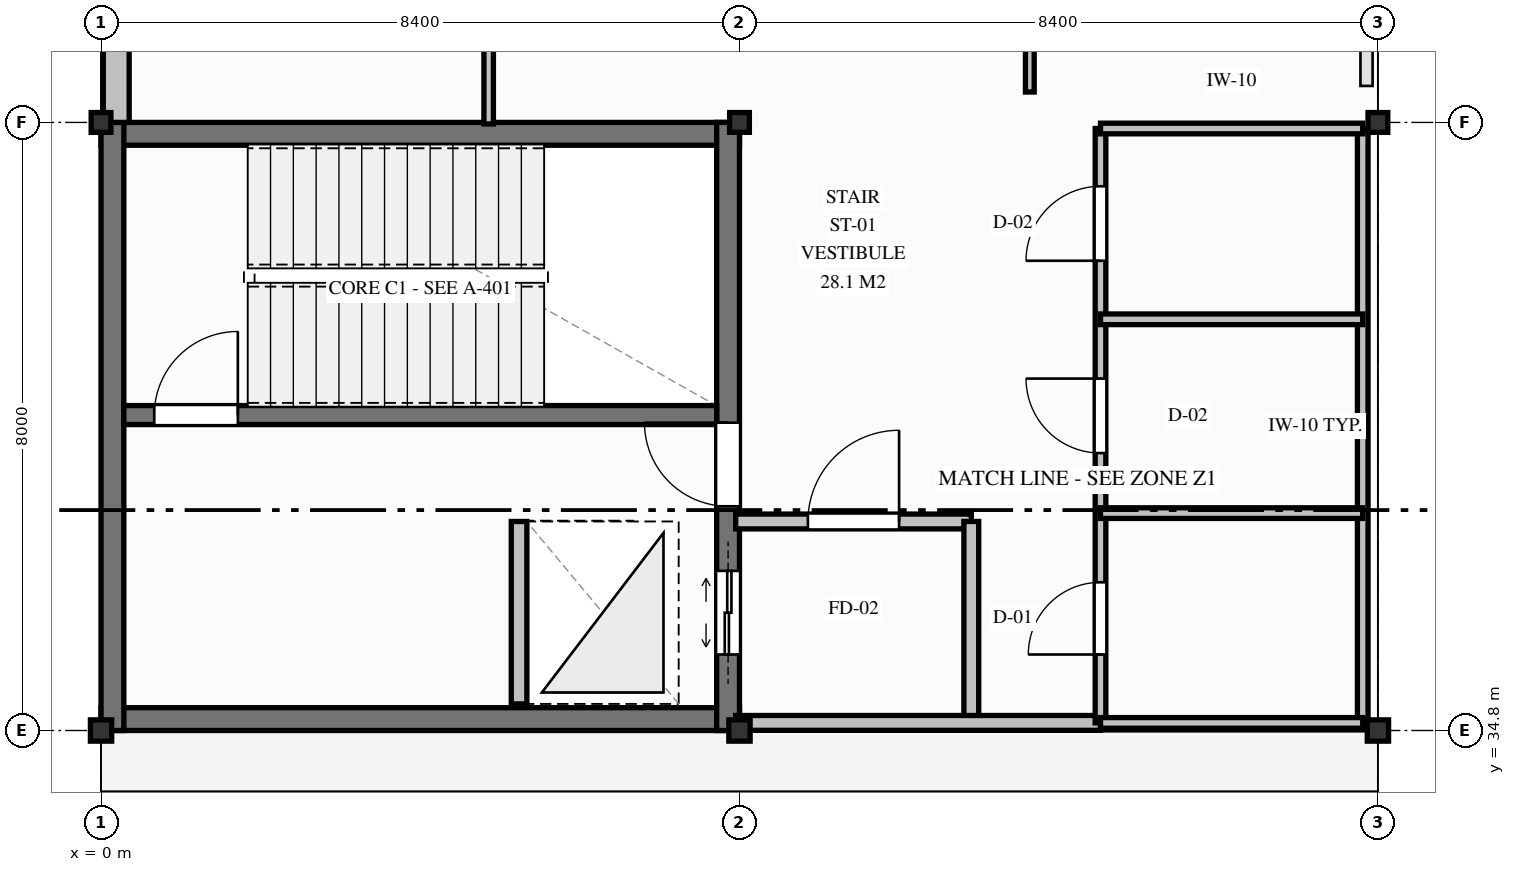
"""IFC4 building model, lengths in metres.
Left out: names, types, materials, properties, quantities, classifications, styles, units other than length and angle.
Written with IfcOpenShell. Run it as: python <this file> out.ifc"""

import sys

from ifc_helpers import new_model, si_unit, direction, frame, frame_2d, origin, origin_2d, place, context, subcontext, project, spatial, rectangle, i_section, extrude, element, fill, save


model = new_model("IFC4")
c1 = context("Model", 3, precision=1e-05, world=origin(), true_north=direction((0.0, 1.0)))
c2 = subcontext(c1, "Body", "Model", "MODEL_VIEW")
j1 = project(units=[si_unit("LENGTHUNIT", "METRE"), si_unit("PLANEANGLEUNIT", "RADIAN")], contexts=[c1])
p1 = place(None, origin())
s1 = spatial("IfcSite", under=j1, at=p1, CompositionType="ELEMENT")
p2 = place(p1, origin())
s2 = spatial("IfcBuilding", under=s1, at=p2, CompositionType="ELEMENT")
p3 = place(p2, frame((0.0, 0.0, 17.25)))
s3 = spatial("IfcBuildingStorey", under=s2, at=p3, CompositionType="ELEMENT", Elevation=17.25)
for number, where, z_axis, x_axis in (
    (1, (0.0, 42.65, 0.0), (0.0, 0.0, 1.0), (1.0, 0.0, 0.0)),
    (2, (0.0, 34.95, 0.0), (0.0, 0.0, 1.0), (1.0, 0.0, 0.0)),
):
    element("IfcWall", number, at=place(p3, frame(where, z_axis=z_axis, x_axis=x_axis)), inside=s3, PredefinedType="SHEAR", context=c2, shape_type="SweptSolid", body=[
        extrude(rectangle(XDim=8.4, YDim=0.3, at=frame_2d((4.2, 0.0))), origin(), (0.0, 0.0, 1.0), 4.05),
    ])
p4 = place(p3, frame((0.15, 34.8, 0.0), z_axis=(0.0, 0.0, 1.0), x_axis=(0.0, 1.0, 0.0)))
e3 = element("IfcWall", 3, at=p4, inside=s3, PredefinedType="SHEAR", context=c2, shape_type="SweptSolid", body=[
    extrude(rectangle(XDim=8.0, YDim=0.3, at=frame_2d((4.0, 0.0))), origin(), (0.0, 0.0, 1.0), 4.05),
])
p5 = place(p3, frame((8.25, 34.8, 0.0), z_axis=(0.0, 0.0, 1.0), x_axis=(0.0, 1.0, 0.0)))
e4 = element("IfcWall", 4, at=p5, inside=s3, PredefinedType="SHEAR", context=c2, shape_type="SweptSolid", body=[
    extrude(rectangle(XDim=8.0, YDim=0.3, at=frame_2d((4.0, 0.0))), origin(), (0.0, 0.0, 1.0), 4.05),
])
p6 = place(p5, frame((2.95, 0.0, 0.0)))
e5 = element("IfcOpeningElement", 5, at=p6, cuts=e4, PredefinedType="OPENING", context=c2, shape_type="SweptSolid", body=[
    extrude(rectangle(XDim=1.1, YDim=2.15, at=frame_2d((0.55, 1.075))), frame((0.0, 0.16, 0.0), z_axis=(0.0, -1.0, 0.0), x_axis=(1.0, 0.0, 0.0)), (0.0, 0.0, 1.0), 0.32),
])
p7 = place(p5, frame((1.0, 0.0, 0.0)))
e6 = element("IfcOpeningElement", 6, at=p7, cuts=e4, PredefinedType="OPENING", context=c2, shape_type="SweptSolid", body=[
    extrude(rectangle(XDim=1.1, YDim=2.1, at=frame_2d((0.55, 1.05))), frame((0.0, 0.16, 0.0), z_axis=(0.0, -1.0, 0.0), x_axis=(1.0, 0.0, 0.0)), (0.0, 0.0, 1.0), 0.32),
])
p8 = place(p3, frame((0.3, 38.95, 0.0), z_axis=(0.0, 0.0, 1.0), x_axis=(1.0, 0.0, 0.0)))
e7 = element("IfcWall", 7, at=p8, inside=s3, PredefinedType="SHEAR", context=c2, shape_type="SweptSolid", body=[
    extrude(rectangle(XDim=7.8, YDim=0.25, at=frame_2d((3.9, 0.0))), origin(), (0.0, 0.0, 1.0), 4.05),
])
p9 = place(p8, frame((0.4, 0.0, 0.0)))
e8 = element("IfcOpeningElement", 8, at=p9, cuts=e7, PredefinedType="OPENING", context=c2, shape_type="SweptSolid", body=[
    extrude(rectangle(XDim=1.1, YDim=2.15, at=frame_2d((0.55, 1.075))), frame((0.0, 0.135, 0.0), z_axis=(0.0, -1.0, 0.0), x_axis=(1.0, 0.0, 0.0)), (0.0, 0.0, 1.0), 0.27),
])
p10 = place(p3, frame((0.0, 34.8, 0.0), z_axis=(0.0, 0.0, 1.0), x_axis=(1.0, 0.0, 0.0)))
e9 = element("IfcColumn", 9, at=p10, inside=s3, PredefinedType="COLUMN", context=c2, shape_type="SweptSolid", body=[
    extrude(i_section(OverallWidth=0.28, OverallDepth=0.28, WebThickness=0.01, FlangeThickness=0.018, FilletRadius=0.024, at=origin_2d()), origin(), (0.0, 0.0, 1.0), 4.05),
])
p11 = place(p3, frame((0.0, 42.8, 0.0), z_axis=(0.0, 0.0, 1.0), x_axis=(1.0, 0.0, 0.0)))
e10 = element("IfcColumn", 10, at=p11, inside=s3, PredefinedType="COLUMN", context=c2, shape_type="SweptSolid", body=[
    extrude(i_section(OverallWidth=0.26, OverallDepth=0.26, WebThickness=0.01, FlangeThickness=0.018, FilletRadius=0.024, at=origin_2d()), origin(), (0.0, 0.0, 1.0), 4.05),
])
p12 = place(p3, frame((8.4, 34.8, 0.0), z_axis=(0.0, 0.0, 1.0), x_axis=(1.0, 0.0, 0.0)))
e11 = element("IfcColumn", 11, at=p12, inside=s3, PredefinedType="COLUMN", context=c2, shape_type="SweptSolid", body=[
    extrude(i_section(OverallWidth=0.28, OverallDepth=0.28, WebThickness=0.01, FlangeThickness=0.018, FilletRadius=0.024, at=origin_2d()), origin(), (0.0, 0.0, 1.0), 4.05),
])
p13 = place(p3, frame((8.4, 42.8, 0.0), z_axis=(0.0, 0.0, 1.0), x_axis=(1.0, 0.0, 0.0)))
e12 = element("IfcColumn", 12, at=p13, inside=s3, PredefinedType="COLUMN", context=c2, shape_type="SweptSolid", body=[
    extrude(i_section(OverallWidth=0.26, OverallDepth=0.26, WebThickness=0.01, FlangeThickness=0.018, FilletRadius=0.024, at=origin_2d()), origin(), (0.0, 0.0, 1.0), 4.05),
])
p14 = place(p3, frame((16.8, 34.8, 0.0), z_axis=(0.0, 0.0, 1.0), x_axis=(1.0, 0.0, 0.0)))
e13 = element("IfcColumn", 13, at=p14, inside=s3, PredefinedType="COLUMN", context=c2, shape_type="SweptSolid", body=[
    extrude(i_section(OverallWidth=0.28, OverallDepth=0.28, WebThickness=0.01, FlangeThickness=0.018, FilletRadius=0.024, at=origin_2d()), origin(), (0.0, 0.0, 1.0), 4.05),
])
p15 = place(p3, frame((16.8, 42.8, 0.0), z_axis=(0.0, 0.0, 1.0), x_axis=(1.0, 0.0, 0.0)))
e14 = element("IfcColumn", 14, at=p15, inside=s3, PredefinedType="COLUMN", context=c2, shape_type="SweptSolid", body=[
    extrude(i_section(OverallWidth=0.26, OverallDepth=0.26, WebThickness=0.01, FlangeThickness=0.018, FilletRadius=0.024, at=origin_2d()), origin(), (0.0, 0.0, 1.0), 4.05),
])
p16 = place(p3, frame((0.2, 42.8, 0.0), z_axis=(0.0, 0.0, 1.0), x_axis=(0.0, 1.0, 0.0)))
e15 = element("IfcWall", 15, at=p16, inside=s3, PredefinedType="SOLIDWALL", context=c2, shape_type="SweptSolid", body=[
    extrude(rectangle(XDim=8.0, YDim=0.34, at=frame_2d((4.0, 0.0))), origin(), (0.0, 0.0, 1.0), 3.278),
])
p17 = place(p16, frame((1.992, 0.0, 0.85)))
e16 = element("IfcOpeningElement", 16, at=p17, cuts=e15, PredefinedType="OPENING", context=c2, shape_type="SweptSolid", body=[
    extrude(rectangle(XDim=1.35, YDim=1.8, at=frame_2d((0.675, 0.9))), frame((0.0, 0.18, 0.0), z_axis=(0.0, -1.0, 0.0), x_axis=(1.0, 0.0, 0.0)), (0.0, 0.0, 1.0), 0.36),
])
p18 = place(p16, frame((4.883, 0.0, 0.85)))
e17 = element("IfcOpeningElement", 17, at=p18, cuts=e15, PredefinedType="OPENING", context=c2, shape_type="SweptSolid", body=[
    extrude(rectangle(XDim=0.9, YDim=1.8, at=frame_2d((0.45, 0.9))), frame((0.0, 0.18, 0.0), z_axis=(0.0, -1.0, 0.0), x_axis=(1.0, 0.0, 0.0)), (0.0, 0.0, 1.0), 0.36),
])
p19 = place(p3, frame((5.5, 35.15, 0.0), z_axis=(0.0, 0.0, 1.0), x_axis=(0.0, 1.0, 0.0)))
e18 = element("IfcWall", 18, at=p19, inside=s3, PredefinedType="PARTITIONING", context=c2, shape_type="SweptSolid", body=[
    extrude(rectangle(XDim=2.4, YDim=0.205, at=frame_2d((1.2, 0.0))), origin(), (0.0, 0.0, 1.0), 3.78),
])
p20 = place(p3, frame((8.35, 37.55, 0.0), z_axis=(0.0, 0.0, 1.0), x_axis=(1.0, 0.0, 0.0)))
e19 = element("IfcWall", 19, at=p20, inside=s3, PredefinedType="PARTITIONING", context=c2, shape_type="SweptSolid", body=[
    extrude(rectangle(XDim=3.1, YDim=0.195, at=frame_2d((1.55, 0.0))), origin(), (0.0, 0.0, 1.0), 3.488),
])
p21 = place(p20, frame((0.95, 0.0, 0.0)))
e20 = element("IfcOpeningElement", 20, at=p21, cuts=e19, PredefinedType="OPENING", context=c2, shape_type="SweptSolid", body=[
    extrude(rectangle(XDim=1.2, YDim=2.15, at=frame_2d((0.6, 1.075))), frame((0.0, 0.107, 0.0), z_axis=(0.0, -1.0, 0.0), x_axis=(1.0, 0.0, 0.0)), (0.0, 0.0, 1.0), 0.215),
])
p22 = place(p3, frame((11.45, 34.9, 0.0), z_axis=(0.0, 0.0, 1.0), x_axis=(0.0, 1.0, 0.0)))
e21 = element("IfcWall", 21, at=p22, inside=s3, PredefinedType="PARTITIONING", context=c2, shape_type="SweptSolid", body=[
    extrude(rectangle(XDim=2.65, YDim=0.195, at=frame_2d((1.325, 0.0))), origin(), (0.0, 0.0, 1.0), 3.508),
])
p23 = place(p3, frame((8.35, 34.9, 0.0), z_axis=(0.0, 0.0, 1.0), x_axis=(1.0, 0.0, 0.0)))
e22 = element("IfcWall", 22, at=p23, inside=s3, PredefinedType="PARTITIONING", context=c2, shape_type="SweptSolid", body=[
    extrude(rectangle(XDim=4.8, YDim=0.195, at=frame_2d((2.4, 0.0))), origin(), (0.0, 0.0, 1.0), 3.448),
])
p24 = place(p3, frame((13.15, 34.9, 0.0), z_axis=(0.0, 0.0, 1.0), x_axis=(0.0, 1.0, 0.0)))
e23 = element("IfcWall", 23, at=p24, inside=s3, PredefinedType="PARTITIONING", context=c2, shape_type="SweptSolid", body=[
    extrude(rectangle(XDim=7.82, YDim=0.14, at=frame_2d((3.91, 0.0))), origin(), (0.0, 0.0, 1.0), 3.508),
])
p25 = place(p24, frame((0.9, 0.0, 0.0)))
e24 = element("IfcOpeningElement", 24, at=p25, cuts=e23, PredefinedType="OPENING", context=c2, shape_type="SweptSolid", body=[
    extrude(rectangle(XDim=0.95, YDim=2.12, at=frame_2d((0.475, 1.06))), frame((0.0, 0.08, 0.0), z_axis=(0.0, -1.0, 0.0), x_axis=(1.0, 0.0, 0.0)), (0.0, 0.0, 1.0), 0.16),
])
p26 = place(p24, frame((3.55, 0.0, 0.0)))
e25 = element("IfcOpeningElement", 25, at=p26, cuts=e23, PredefinedType="OPENING", context=c2, shape_type="SweptSolid", body=[
    extrude(rectangle(XDim=0.98, YDim=2.14, at=frame_2d((0.49, 1.07))), frame((0.0, 0.08, 0.0), z_axis=(0.0, -1.0, 0.0), x_axis=(1.0, 0.0, 0.0)), (0.0, 0.0, 1.0), 0.16),
])
p27 = place(p24, frame((6.08, 0.0, 0.0)))
e26 = element("IfcOpeningElement", 26, at=p27, cuts=e23, PredefinedType="OPENING", context=c2, shape_type="SweptSolid", body=[
    extrude(rectangle(XDim=0.98, YDim=2.14, at=frame_2d((0.49, 1.07))), frame((0.0, 0.08, 0.0), z_axis=(0.0, -1.0, 0.0), x_axis=(1.0, 0.0, 0.0)), (0.0, 0.0, 1.0), 0.16),
])
p28 = place(p3, frame((16.6, 34.9, 0.0), z_axis=(0.0, 0.0, 1.0), x_axis=(0.0, 1.0, 0.0)))
e27 = element("IfcWall", 27, at=p28, inside=s3, PredefinedType="PARTITIONING", context=c2, shape_type="SweptSolid", body=[
    extrude(rectangle(XDim=7.82, YDim=0.14, at=frame_2d((3.91, 0.0))), origin(), (0.0, 0.0, 1.0), 3.178),
])
p29 = place(p3, frame((13.15, 34.9, 0.0), z_axis=(0.0, 0.0, 1.0), x_axis=(1.0, 0.0, 0.0)))
e28 = element("IfcWall", 28, at=p29, inside=s3, PredefinedType="PARTITIONING", context=c2, shape_type="SweptSolid", body=[
    extrude(rectangle(XDim=3.45, YDim=0.14, at=frame_2d((1.725, 0.0))), origin(), (0.0, 0.0, 1.0), 3.228),
])
p30 = place(p3, frame((13.15, 42.72, 0.0), z_axis=(0.0, 0.0, 1.0), x_axis=(1.0, 0.0, 0.0)))
e29 = element("IfcWall", 29, at=p30, inside=s3, PredefinedType="PARTITIONING", context=c2, shape_type="SweptSolid", body=[
    extrude(rectangle(XDim=3.45, YDim=0.14, at=frame_2d((1.725, 0.0))), origin(), (0.0, 0.0, 1.0), 3.178),
])
for number, where, z_axis, x_axis in (
    (30, (13.15, 37.66, 0.0), (0.0, 0.0, 1.0), (1.0, 0.0, 0.0)),
    (31, (13.15, 40.21, 0.0), (0.0, 0.0, 1.0), (1.0, 0.0, 0.0)),
):
    element("IfcWall", number, at=place(p3, frame(where, z_axis=z_axis, x_axis=x_axis)), inside=s3, PredefinedType="PARTITIONING", context=c2, shape_type="SweptSolid", body=[
        extrude(rectangle(XDim=3.45, YDim=0.14, at=frame_2d((1.725, 0.0))), origin(), (0.0, 0.0, 1.0), 3.228),
    ])
p31 = place(p3, frame((5.1, 42.78, 0.0), z_axis=(0.0, 0.0, 1.0), x_axis=(0.0, 1.0, 0.0)))
e32 = element("IfcWall", 32, at=p31, inside=s3, PredefinedType="PARTITIONING", context=c2, shape_type="SweptSolid", body=[
    extrude(rectangle(XDim=50.77, YDim=0.125, at=frame_2d((25.385, 0.0))), origin(), (0.0, 0.0, 1.0), 3.278),
])
p32 = place(p31, frame((25.045, 0.0, 0.0)))
e33 = element("IfcOpeningElement", 33, at=p32, cuts=e32, PredefinedType="OPENING", context=c2, shape_type="SweptSolid", body=[
    extrude(rectangle(XDim=1.06, YDim=2.16, at=frame_2d((0.53, 1.08))), frame((0.0, 0.073, 0.0), z_axis=(0.0, -1.0, 0.0), x_axis=(1.0, 0.0, 0.0)), (0.0, 0.0, 1.0), 0.145),
])
p33 = place(p3, frame((12.22, 43.2, 0.0), z_axis=(0.0, 0.0, 1.0), x_axis=(0.0, 1.0, 0.0)))
e34 = element("IfcWall", 34, at=p33, inside=s3, PredefinedType="PARTITIONING", context=c2, shape_type="SweptSolid", body=[
    extrude(rectangle(XDim=2.02, YDim=0.115, at=frame_2d((1.01, 0.0))), origin(), (0.0, 0.0, 1.0), 3.78),
])
p34 = place(p9, origin())
e35 = element("IfcDoor", 35, at=p34, inside=s3, OperationType="SINGLE_SWING_RIGHT", PredefinedType="DOOR", context=c2, shape_type="SweptSolid", body=[
    extrude(rectangle(XDim=1.1, YDim=2.15, at=frame_2d((0.55, 1.075))), frame((0.0, 0.025, 0.0), z_axis=(0.0, -1.0, 0.0), x_axis=(1.0, 0.0, 0.0)), (0.0, 0.0, 1.0), 0.05),
])
fill(e8, e35)
p35 = place(p6, origin())
e36 = element("IfcDoor", 36, at=p35, inside=s3, OperationType="SINGLE_SWING_RIGHT", PredefinedType="DOOR", context=c2, shape_type="SweptSolid", body=[
    extrude(rectangle(XDim=1.1, YDim=2.15, at=frame_2d((0.55, 1.075))), frame((0.0, 0.025, 0.0), z_axis=(0.0, -1.0, 0.0), x_axis=(1.0, 0.0, 0.0)), (0.0, 0.0, 1.0), 0.05),
])
fill(e5, e36)
p36 = place(p7, origin())
e37 = element("IfcDoor", 37, at=p36, inside=s3, OperationType="DOUBLE_DOOR_SLIDING", PredefinedType="DOOR", context=c2, shape_type="SweptSolid", body=[
    extrude(rectangle(XDim=1.1, YDim=2.1, at=frame_2d((0.55, 1.05))), frame((0.0, 0.025, 0.0), z_axis=(0.0, -1.0, 0.0), x_axis=(1.0, 0.0, 0.0)), (0.0, 0.0, 1.0), 0.05),
])
fill(e6, e37)
p37 = place(p21, origin())
e38 = element("IfcDoor", 38, at=p37, inside=s3, OperationType="SINGLE_SWING_RIGHT", PredefinedType="DOOR", context=c2, shape_type="SweptSolid", body=[
    extrude(rectangle(XDim=1.2, YDim=2.15, at=frame_2d((0.6, 1.075))), frame((0.0, 0.025, 0.0), z_axis=(0.0, -1.0, 0.0), x_axis=(1.0, 0.0, 0.0)), (0.0, 0.0, 1.0), 0.05),
])
fill(e20, e38)
p38 = place(p25, origin())
e39 = element("IfcDoor", 39, at=p38, inside=s3, OperationType="SINGLE_SWING_LEFT", PredefinedType="DOOR", context=c2, shape_type="SweptSolid", body=[
    extrude(rectangle(XDim=0.95, YDim=2.12, at=frame_2d((0.475, 1.06))), frame((0.0, 0.025, 0.0), z_axis=(0.0, -1.0, 0.0), x_axis=(1.0, 0.0, 0.0)), (0.0, 0.0, 1.0), 0.05),
])
fill(e24, e39)
p39 = place(p26, origin())
e40 = element("IfcDoor", 40, at=p39, inside=s3, OperationType="SINGLE_SWING_RIGHT", PredefinedType="DOOR", context=c2, shape_type="SweptSolid", body=[
    extrude(rectangle(XDim=0.98, YDim=2.14, at=frame_2d((0.49, 1.07))), frame((0.0, 0.025, 0.0), z_axis=(0.0, -1.0, 0.0), x_axis=(1.0, 0.0, 0.0)), (0.0, 0.0, 1.0), 0.05),
])
fill(e25, e40)
p40 = place(p27, origin())
e41 = element("IfcDoor", 41, at=p40, inside=s3, OperationType="SINGLE_SWING_LEFT", PredefinedType="DOOR", context=c2, shape_type="SweptSolid", body=[
    extrude(rectangle(XDim=0.98, YDim=2.14, at=frame_2d((0.49, 1.07))), frame((0.0, 0.025, 0.0), z_axis=(0.0, -1.0, 0.0), x_axis=(1.0, 0.0, 0.0)), (0.0, 0.0, 1.0), 0.05),
])
fill(e26, e41)
save(model, sys.argv[1])
